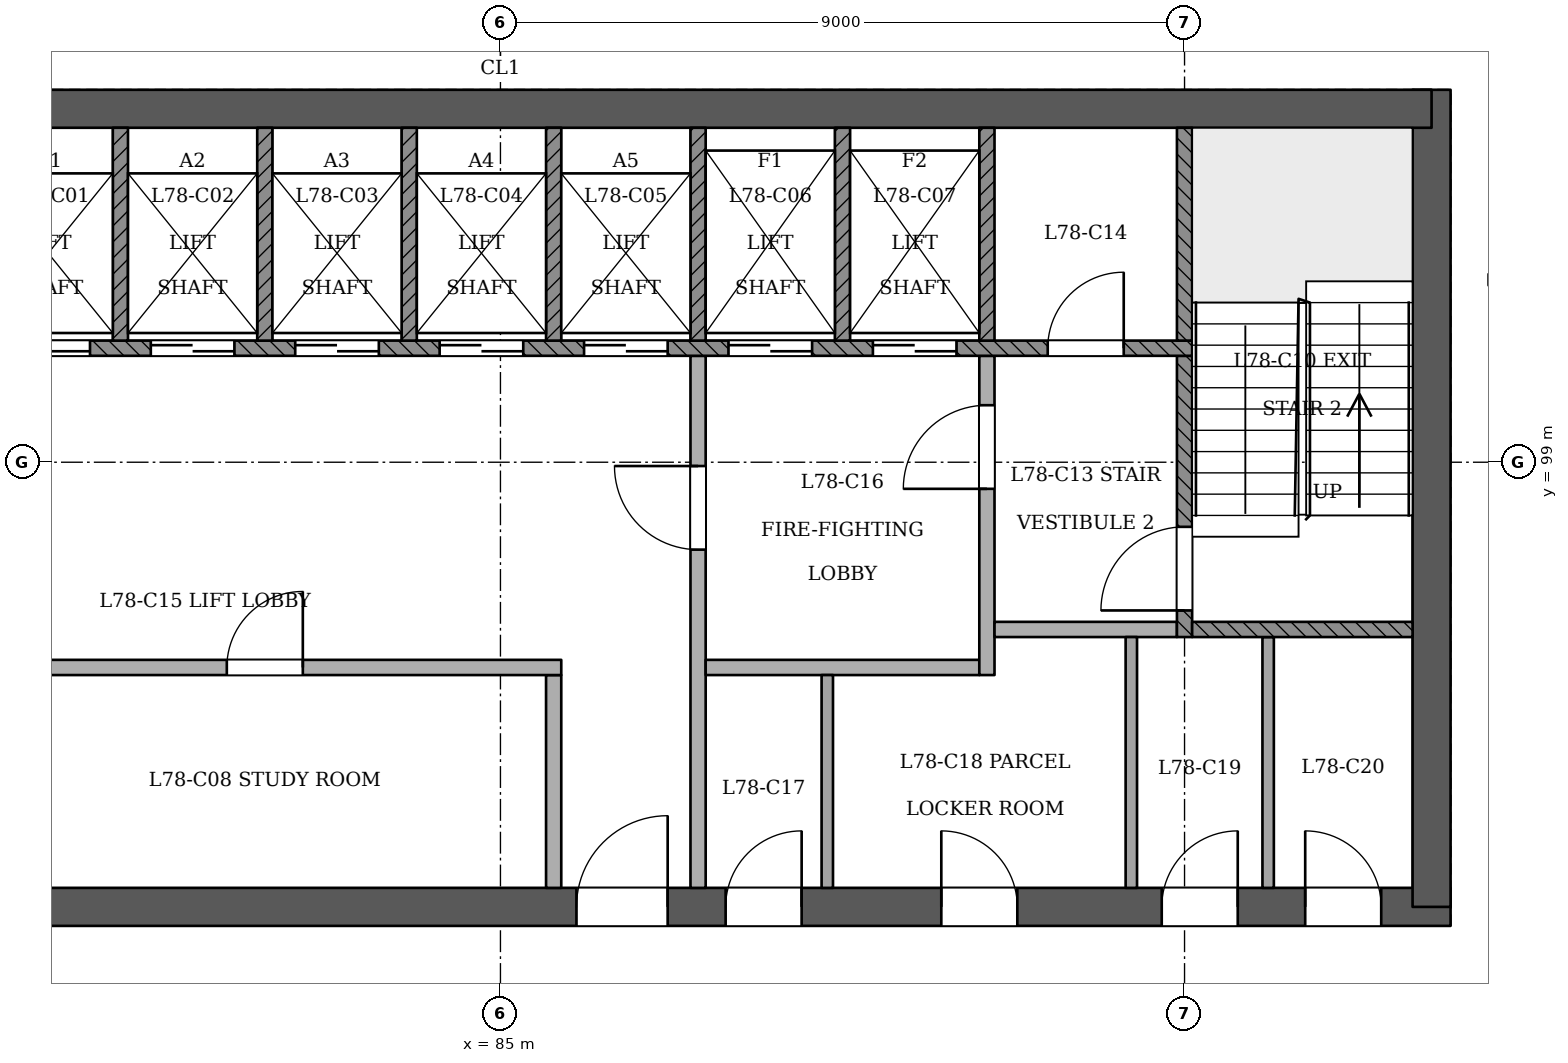
"""IFC4 building model, lengths in metres.
Left out: names, types, materials, properties, quantities, classifications, styles, units other than length and angle.
Written with IfcOpenShell. Run it as: python <this file> out.ifc"""

import sys

from ifc_helpers import new_model, si_unit, direction, frame, frame_2d, origin, place, context, subcontext, project, spatial, rectangle, extrude, element, fill, save


model = new_model("IFC4")
c1 = context("Model", 3, precision=1e-05, world=origin(), true_north=direction((0.0, 1.0)))
c2 = subcontext(c1, "Body", "Model", "MODEL_VIEW")
j1 = project(units=[si_unit("LENGTHUNIT", "METRE"), si_unit("PLANEANGLEUNIT", "RADIAN")], contexts=[c1])
p1 = place(None, origin())
s1 = spatial("IfcSite", under=j1, at=p1, CompositionType="ELEMENT")
p2 = place(p1, origin())
s2 = spatial("IfcBuilding", under=s1, at=p2, CompositionType="ELEMENT")
p3 = place(p2, frame((0.0, 0.0, 302.2)))
s3 = spatial("IfcBuildingStorey", under=s2, at=p3, CompositionType="ELEMENT", Elevation=302.2)
p4 = place(p3, frame((72.75, 93.15, 0.0), z_axis=(0.0, 0.0, 1.0), x_axis=(1.0, 0.0, 0.0)))
e1 = element("IfcWall", 1, at=p4, inside=s3, PredefinedType="SHEAR", context=c2, shape_type="SweptSolid", body=[
    extrude(rectangle(XDim=24.75, YDim=0.5, at=frame_2d((12.375, 0.0))), origin(), (0.0, 0.0, 1.0), 3.6),
])
p5 = place(p4, frame((1.05, 0.0, 0.0)))
e2 = element("IfcOpeningElement", 2, at=p5, cuts=e1, PredefinedType="OPENING", context=c2, shape_type="SweptSolid", body=[
    extrude(rectangle(XDim=1.2, YDim=2.1, at=frame_2d((0.6, 1.05))), frame((0.0, 0.26, 0.0), z_axis=(0.0, -1.0, 0.0), x_axis=(1.0, 0.0, 0.0)), (0.0, 0.0, 1.0), 0.521),
])
p6 = place(p4, frame((3.25, 0.0, 0.0)))
e3 = element("IfcOpeningElement", 3, at=p6, cuts=e1, PredefinedType="OPENING", context=c2, shape_type="SweptSolid", body=[
    extrude(rectangle(XDim=1.2, YDim=2.1, at=frame_2d((0.6, 1.05))), frame((0.0, 0.26, 0.0), z_axis=(0.0, -1.0, 0.0), x_axis=(1.0, 0.0, 0.0)), (0.0, 0.0, 1.0), 0.521),
])
p7 = place(p4, frame((13.25, 0.0, 0.0)))
e4 = element("IfcOpeningElement", 4, at=p7, cuts=e1, PredefinedType="OPENING", context=c2, shape_type="SweptSolid", body=[
    extrude(rectangle(XDim=1.2, YDim=2.1, at=frame_2d((0.6, 1.05))), frame((0.0, 0.26, 0.0), z_axis=(0.0, -1.0, 0.0), x_axis=(1.0, 0.0, 0.0)), (0.0, 0.0, 1.0), 0.521),
])
p8 = place(p4, frame((15.212, 0.0, 0.0)))
e5 = element("IfcOpeningElement", 5, at=p8, cuts=e1, PredefinedType="OPENING", context=c2, shape_type="SweptSolid", body=[
    extrude(rectangle(XDim=1.0, YDim=2.1, at=frame_2d((0.5, 1.05))), frame((0.0, 0.26, 0.0), z_axis=(0.0, -1.0, 0.0), x_axis=(1.0, 0.0, 0.0)), (0.0, 0.0, 1.0), 0.521),
])
p9 = place(p4, frame((18.05, 0.0, 0.0)))
e6 = element("IfcOpeningElement", 6, at=p9, cuts=e1, PredefinedType="OPENING", context=c2, shape_type="SweptSolid", body=[
    extrude(rectangle(XDim=1.0, YDim=2.1, at=frame_2d((0.5, 1.05))), frame((0.0, 0.26, 0.0), z_axis=(0.0, -1.0, 0.0), x_axis=(1.0, 0.0, 0.0)), (0.0, 0.0, 1.0), 0.521),
])
p10 = place(p4, frame((20.95, 0.0, 0.0)))
e7 = element("IfcOpeningElement", 7, at=p10, cuts=e1, PredefinedType="OPENING", context=c2, shape_type="SweptSolid", body=[
    extrude(rectangle(XDim=1.0, YDim=2.1, at=frame_2d((0.5, 1.05))), frame((0.0, 0.26, 0.0), z_axis=(0.0, -1.0, 0.0), x_axis=(1.0, 0.0, 0.0)), (0.0, 0.0, 1.0), 0.521),
])
p11 = place(p4, frame((22.837, 0.0, 0.0)))
e8 = element("IfcOpeningElement", 8, at=p11, cuts=e1, PredefinedType="OPENING", context=c2, shape_type="SweptSolid", body=[
    extrude(rectangle(XDim=1.0, YDim=2.1, at=frame_2d((0.5, 1.05))), frame((0.0, 0.26, 0.0), z_axis=(0.0, -1.0, 0.0), x_axis=(1.0, 0.0, 0.0)), (0.0, 0.0, 1.0), 0.521),
])
p12 = place(p3, frame((97.25, 93.15, 0.0), z_axis=(0.0, 0.0, 1.0), x_axis=(0.0, 1.0, 0.0)))
e9 = element("IfcWall", 9, at=p12, inside=s3, PredefinedType="SHEAR", context=c2, shape_type="SweptSolid", body=[
    extrude(rectangle(XDim=10.75, YDim=0.5, at=frame_2d((5.375, 0.0))), origin(), (0.0, 0.0, 1.0), 3.6),
])
p13 = place(p3, frame((97.25, 103.65, 0.0), z_axis=(0.0, 0.0, 1.0), x_axis=(-1.0, 0.0, 0.0)))
e10 = element("IfcWall", 10, at=p13, inside=s3, PredefinedType="SHEAR", context=c2, shape_type="SweptSolid", body=[
    extrude(rectangle(XDim=24.75, YDim=0.5, at=frame_2d((12.375, 0.0))), origin(), (0.0, 0.0, 1.0), 3.6),
])
p14 = place(p3, frame((99.726, 101.4, 0.0), z_axis=(0.0, 0.0, 1.0), x_axis=(-0.999999909973, 0.000424328109, 0.0)))
e11 = element("IfcWall", 11, at=p14, inside=s3, PredefinedType="PARTITIONING", context=c2, shape_type="SweptSolid", body=[
    extrude(rectangle(XDim=1.726, YDim=0.15, at=frame_2d((0.863, 0.0))), origin(), (0.0, 0.0, 1.0), 3.2),
])
p15 = place(p3, frame((85.7, 93.4, 0.0), z_axis=(0.0, 0.0, 1.0), x_axis=(0.0, 1.0, 0.0)))
e12 = element("IfcWall", 12, at=p15, inside=s3, PredefinedType="PARTITIONING", context=c2, shape_type="SweptSolid", body=[
    extrude(rectangle(XDim=2.8, YDim=0.2, at=frame_2d((1.4, 0.0))), origin(), (0.0, 0.0, 1.0), 3.2),
])
p16 = place(p3, frame((87.6, 93.4, 0.0), z_axis=(0.0, 0.0, 1.0), x_axis=(0.0, 1.0, 0.0)))
e13 = element("IfcWall", 13, at=p16, inside=s3, PredefinedType="PARTITIONING", context=c2, shape_type="SweptSolid", body=[
    extrude(rectangle(XDim=7.0, YDim=0.2, at=frame_2d((3.5, 0.0))), origin(), (0.0, 0.0, 1.0), 3.2),
])
p17 = place(p16, frame((4.45, 0.0, 0.0)))
e14 = element("IfcOpeningElement", 14, at=p17, cuts=e13, PredefinedType="OPENING", context=c2, shape_type="SweptSolid", body=[
    extrude(rectangle(XDim=1.1, YDim=2.1, at=frame_2d((0.55, 1.05))), frame((0.0, 0.11, 0.0), z_axis=(0.0, -1.0, 0.0), x_axis=(1.0, 0.0, 0.0)), (0.0, 0.0, 1.0), 0.221),
])
p18 = place(p3, frame((89.3, 93.4, 0.0), z_axis=(0.0, 0.0, 1.0), x_axis=(0.0, 1.0, 0.0)))
e15 = element("IfcWall", 15, at=p18, inside=s3, PredefinedType="PARTITIONING", context=c2, shape_type="SweptSolid", body=[
    extrude(rectangle(XDim=2.8, YDim=0.15, at=frame_2d((1.4, 0.0))), origin(), (0.0, 0.0, 1.0), 3.2),
])
for number, where, z_axis, x_axis in (
    (16, (93.3, 93.4, 0.0), (0.0, 0.0, 1.0), (0.0, 1.0, 0.0)),
    (17, (95.1, 93.4, 0.0), (0.0, 0.0, 1.0), (0.0, 1.0, 0.0)),
):
    element("IfcWall", number, at=place(p3, frame(where, z_axis=z_axis, x_axis=x_axis)), inside=s3, PredefinedType="PARTITIONING", context=c2, shape_type="SweptSolid", body=[
        extrude(rectangle(XDim=3.3, YDim=0.15, at=frame_2d((1.65, 0.0))), origin(), (0.0, 0.0, 1.0), 3.2),
    ])
p19 = place(p3, frame((78.0, 96.3, 0.0), z_axis=(0.0, 0.0, 1.0), x_axis=(1.0, 0.0, 0.0)))
e18 = element("IfcWall", 18, at=p19, inside=s3, PredefinedType="PARTITIONING", context=c2, shape_type="SweptSolid", body=[
    extrude(rectangle(XDim=7.8, YDim=0.2, at=frame_2d((3.9, 0.0))), origin(), (0.0, 0.0, 1.0), 3.2),
])
p20 = place(p19, frame((3.4, 0.0, 0.0)))
e19 = element("IfcOpeningElement", 19, at=p20, cuts=e18, PredefinedType="OPENING", context=c2, shape_type="SweptSolid", body=[
    extrude(rectangle(XDim=1.0, YDim=2.1, at=frame_2d((0.5, 1.05))), frame((0.0, 0.11, 0.0), z_axis=(0.0, -1.0, 0.0), x_axis=(1.0, 0.0, 0.0)), (0.0, 0.0, 1.0), 0.221),
])
p21 = place(p3, frame((87.7, 96.3, 0.0), z_axis=(0.0, 0.0, 1.0), x_axis=(1.0, 0.0, 0.0)))
e20 = element("IfcWall", 20, at=p21, inside=s3, PredefinedType="PARTITIONING", context=c2, shape_type="SweptSolid", body=[
    extrude(rectangle(XDim=3.6, YDim=0.2, at=frame_2d((1.8, 0.0))), origin(), (0.0, 0.0, 1.0), 3.2),
])
p22 = place(p3, frame((91.4, 96.2, 0.0), z_axis=(0.0, 0.0, 1.0), x_axis=(0.0, 1.0, 0.0)))
e21 = element("IfcWall", 21, at=p22, inside=s3, PredefinedType="PARTITIONING", context=c2, shape_type="SweptSolid", body=[
    extrude(rectangle(XDim=4.2, YDim=0.2, at=frame_2d((2.1, 0.0))), origin(), (0.0, 0.0, 1.0), 3.2),
])
p23 = place(p22, frame((2.45, 0.0, 0.0)))
e22 = element("IfcOpeningElement", 22, at=p23, cuts=e21, PredefinedType="OPENING", context=c2, shape_type="SweptSolid", body=[
    extrude(rectangle(XDim=1.1, YDim=2.1, at=frame_2d((0.55, 1.05))), frame((0.0, 0.11, 0.0), z_axis=(0.0, -1.0, 0.0), x_axis=(1.0, 0.0, 0.0)), (0.0, 0.0, 1.0), 0.221),
])
p24 = place(p3, frame((91.5, 96.8, 0.0), z_axis=(0.0, 0.0, 1.0), x_axis=(1.0, 0.0, 0.0)))
e23 = element("IfcWall", 23, at=p24, inside=s3, PredefinedType="PARTITIONING", context=c2, shape_type="SweptSolid", body=[
    extrude(rectangle(XDim=2.4, YDim=0.2, at=frame_2d((1.2, 0.0))), origin(), (0.0, 0.0, 1.0), 3.2),
])
p25 = place(p3, frame((94.0, 96.7, 0.0), z_axis=(0.0, 0.0, 1.0), x_axis=(0.0, 1.0, 0.0)))
e24 = element("IfcWall", 24, at=p25, inside=s3, PredefinedType="SOLIDWALL", context=c2, shape_type="SweptSolid", body=[
    extrude(rectangle(XDim=3.7, YDim=0.2, at=frame_2d((1.85, 0.0))), origin(), (0.0, 0.0, 1.0), 3.2),
])
p26 = place(p25, frame((0.35, 0.0, 0.0)))
e25 = element("IfcOpeningElement", 25, at=p26, cuts=e24, PredefinedType="OPENING", context=c2, shape_type="SweptSolid", body=[
    extrude(rectangle(XDim=1.1, YDim=2.1, at=frame_2d((0.55, 1.05))), frame((0.0, 0.11, 0.0), z_axis=(0.0, -1.0, 0.0), x_axis=(1.0, 0.0, 0.0)), (0.0, 0.0, 1.0), 0.221),
])
p27 = place(p3, frame((94.1, 96.8, 0.0), z_axis=(0.0, 0.0, 1.0), x_axis=(1.0, 0.0, 0.0)))
e26 = element("IfcWall", 26, at=p27, inside=s3, PredefinedType="SOLIDWALL", context=c2, shape_type="SweptSolid", body=[
    extrude(rectangle(XDim=2.9, YDim=0.2, at=frame_2d((1.45, 0.0))), origin(), (0.0, 0.0, 1.0), 3.2),
])
p28 = place(p3, frame((75.9, 100.5, 0.0), z_axis=(0.0, 0.0, 1.0), x_axis=(1.0, 0.0, 0.0)))
e27 = element("IfcWall", 27, at=p28, inside=s3, PredefinedType="SOLIDWALL", context=c2, shape_type="SweptSolid", body=[
    extrude(rectangle(XDim=18.2, YDim=0.2, at=frame_2d((9.1, 0.0))), origin(), (0.0, 0.0, 1.0), 3.2),
])
p29 = place(p28, frame((2.6, 0.0, 0.0)))
e28 = element("IfcOpeningElement", 28, at=p29, cuts=e27, PredefinedType="OPENING", context=c2, shape_type="SweptSolid", body=[
    extrude(rectangle(XDim=1.1, YDim=2.1, at=frame_2d((0.55, 1.05))), frame((0.0, 0.11, 0.0), z_axis=(0.0, -1.0, 0.0), x_axis=(1.0, 0.0, 0.0)), (0.0, 0.0, 1.0), 0.221),
])
p30 = place(p28, frame((4.5, 0.0, 0.0)))
e29 = element("IfcOpeningElement", 29, at=p30, cuts=e27, PredefinedType="OPENING", context=c2, shape_type="SweptSolid", body=[
    extrude(rectangle(XDim=1.1, YDim=2.1, at=frame_2d((0.55, 1.05))), frame((0.0, 0.11, 0.0), z_axis=(0.0, -1.0, 0.0), x_axis=(1.0, 0.0, 0.0)), (0.0, 0.0, 1.0), 0.221),
])
p31 = place(p28, frame((6.4, 0.0, 0.0)))
e30 = element("IfcOpeningElement", 30, at=p31, cuts=e27, PredefinedType="OPENING", context=c2, shape_type="SweptSolid", body=[
    extrude(rectangle(XDim=1.1, YDim=2.1, at=frame_2d((0.55, 1.05))), frame((0.0, 0.11, 0.0), z_axis=(0.0, -1.0, 0.0), x_axis=(1.0, 0.0, 0.0)), (0.0, 0.0, 1.0), 0.221),
])
p32 = place(p28, frame((8.3, 0.0, 0.0)))
e31 = element("IfcOpeningElement", 31, at=p32, cuts=e27, PredefinedType="OPENING", context=c2, shape_type="SweptSolid", body=[
    extrude(rectangle(XDim=1.1, YDim=2.1, at=frame_2d((0.55, 1.05))), frame((0.0, 0.11, 0.0), z_axis=(0.0, -1.0, 0.0), x_axis=(1.0, 0.0, 0.0)), (0.0, 0.0, 1.0), 0.221),
])
p33 = place(p28, frame((10.2, 0.0, 0.0)))
e32 = element("IfcOpeningElement", 32, at=p33, cuts=e27, PredefinedType="OPENING", context=c2, shape_type="SweptSolid", body=[
    extrude(rectangle(XDim=1.1, YDim=2.1, at=frame_2d((0.55, 1.05))), frame((0.0, 0.11, 0.0), z_axis=(0.0, -1.0, 0.0), x_axis=(1.0, 0.0, 0.0)), (0.0, 0.0, 1.0), 0.221),
])
p34 = place(p28, frame((12.1, 0.0, 0.0)))
e33 = element("IfcOpeningElement", 33, at=p34, cuts=e27, PredefinedType="OPENING", context=c2, shape_type="SweptSolid", body=[
    extrude(rectangle(XDim=1.1, YDim=2.1, at=frame_2d((0.55, 1.05))), frame((0.0, 0.11, 0.0), z_axis=(0.0, -1.0, 0.0), x_axis=(1.0, 0.0, 0.0)), (0.0, 0.0, 1.0), 0.221),
])
p35 = place(p28, frame((14.0, 0.0, 0.0)))
e34 = element("IfcOpeningElement", 34, at=p35, cuts=e27, PredefinedType="OPENING", context=c2, shape_type="SweptSolid", body=[
    extrude(rectangle(XDim=1.1, YDim=2.1, at=frame_2d((0.55, 1.05))), frame((0.0, 0.11, 0.0), z_axis=(0.0, -1.0, 0.0), x_axis=(1.0, 0.0, 0.0)), (0.0, 0.0, 1.0), 0.221),
])
p36 = place(p28, frame((0.65, 0.0, 0.0)))
e35 = element("IfcOpeningElement", 35, at=p36, cuts=e27, PredefinedType="OPENING", context=c2, shape_type="SweptSolid", body=[
    extrude(rectangle(XDim=1.0, YDim=2.1, at=frame_2d((0.5, 1.05))), frame((0.0, 0.11, 0.0), z_axis=(0.0, -1.0, 0.0), x_axis=(1.0, 0.0, 0.0)), (0.0, 0.0, 1.0), 0.221),
])
p37 = place(p28, frame((16.3, 0.0, 0.0)))
e36 = element("IfcOpeningElement", 36, at=p37, cuts=e27, PredefinedType="OPENING", context=c2, shape_type="SweptSolid", body=[
    extrude(rectangle(XDim=1.0, YDim=2.1, at=frame_2d((0.5, 1.05))), frame((0.0, 0.11, 0.0), z_axis=(0.0, -1.0, 0.0), x_axis=(1.0, 0.0, 0.0)), (0.0, 0.0, 1.0), 0.221),
])
for number, where, z_axis, x_axis in (
    (37, (80.0, 100.6, 0.0), (0.0, 0.0, 1.0), (0.0, 1.0, 0.0)),
    (38, (81.9, 100.6, 0.0), (0.0, 0.0, 1.0), (0.0, 1.0, 0.0)),
    (39, (83.8, 100.6, 0.0), (0.0, 0.0, 1.0), (0.0, 1.0, 0.0)),
    (40, (85.7, 100.6, 0.0), (0.0, 0.0, 1.0), (0.0, 1.0, 0.0)),
    (41, (87.6, 100.6, 0.0), (0.0, 0.0, 1.0), (0.0, 1.0, 0.0)),
    (42, (89.5, 100.6, 0.0), (0.0, 0.0, 1.0), (0.0, 1.0, 0.0)),
    (43, (91.4, 100.6, 0.0), (0.0, 0.0, 1.0), (0.0, 1.0, 0.0)),
    (44, (94.0, 100.6, 0.0), (0.0, 0.0, 1.0), (0.0, 1.0, 0.0)),
):
    element("IfcWall", number, at=place(p3, frame(where, z_axis=z_axis, x_axis=x_axis)), inside=s3, PredefinedType="SOLIDWALL", context=c2, shape_type="SweptSolid", body=[
        extrude(rectangle(XDim=2.8, YDim=0.2, at=frame_2d((1.4, 0.0))), origin(), (0.0, 0.0, 1.0), 3.2),
    ])
p38 = place(p29, origin())
e45 = element("IfcDoor", 45, at=p38, inside=s3, OperationType="SLIDING_TO_RIGHT", PredefinedType="NOTDEFINED", context=c2, shape_type="SweptSolid", body=[
    extrude(rectangle(XDim=1.1, YDim=2.1, at=frame_2d((0.55, 1.05))), frame((0.0, 0.025, 0.0), z_axis=(0.0, -1.0, 0.0), x_axis=(1.0, 0.0, 0.0)), (0.0, 0.0, 1.0), 0.05),
])
fill(e28, e45)
p39 = place(p30, origin())
e46 = element("IfcDoor", 46, at=p39, inside=s3, OperationType="SLIDING_TO_LEFT", PredefinedType="NOTDEFINED", context=c2, shape_type="SweptSolid", body=[
    extrude(rectangle(XDim=1.1, YDim=2.1, at=frame_2d((0.55, 1.05))), frame((0.0, 0.025, 0.0), z_axis=(0.0, -1.0, 0.0), x_axis=(1.0, 0.0, 0.0)), (0.0, 0.0, 1.0), 0.05),
])
fill(e29, e46)
p40 = place(p31, origin())
e47 = element("IfcDoor", 47, at=p40, inside=s3, OperationType="SLIDING_TO_RIGHT", PredefinedType="NOTDEFINED", context=c2, shape_type="SweptSolid", body=[
    extrude(rectangle(XDim=1.1, YDim=2.1, at=frame_2d((0.55, 1.05))), frame((0.0, 0.025, 0.0), z_axis=(0.0, -1.0, 0.0), x_axis=(1.0, 0.0, 0.0)), (0.0, 0.0, 1.0), 0.05),
])
fill(e30, e47)
p41 = place(p32, origin())
e48 = element("IfcDoor", 48, at=p41, inside=s3, OperationType="SLIDING_TO_LEFT", PredefinedType="NOTDEFINED", context=c2, shape_type="SweptSolid", body=[
    extrude(rectangle(XDim=1.1, YDim=2.1, at=frame_2d((0.55, 1.05))), frame((0.0, 0.025, 0.0), z_axis=(0.0, -1.0, 0.0), x_axis=(1.0, 0.0, 0.0)), (0.0, 0.0, 1.0), 0.05),
])
fill(e31, e48)
p42 = place(p33, origin())
e49 = element("IfcDoor", 49, at=p42, inside=s3, OperationType="SLIDING_TO_RIGHT", PredefinedType="NOTDEFINED", context=c2, shape_type="SweptSolid", body=[
    extrude(rectangle(XDim=1.1, YDim=2.1, at=frame_2d((0.55, 1.05))), frame((0.0, 0.025, 0.0), z_axis=(0.0, -1.0, 0.0), x_axis=(1.0, 0.0, 0.0)), (0.0, 0.0, 1.0), 0.05),
])
fill(e32, e49)
p43 = place(p34, origin())
e50 = element("IfcDoor", 50, at=p43, inside=s3, OperationType="SLIDING_TO_RIGHT", PredefinedType="NOTDEFINED", context=c2, shape_type="SweptSolid", body=[
    extrude(rectangle(XDim=1.1, YDim=2.1, at=frame_2d((0.55, 1.05))), frame((0.0, 0.025, 0.0), z_axis=(0.0, -1.0, 0.0), x_axis=(1.0, 0.0, 0.0)), (0.0, 0.0, 1.0), 0.05),
])
fill(e33, e50)
p44 = place(p35, origin())
e51 = element("IfcDoor", 51, at=p44, inside=s3, OperationType="SLIDING_TO_LEFT", PredefinedType="NOTDEFINED", context=c2, shape_type="SweptSolid", body=[
    extrude(rectangle(XDim=1.1, YDim=2.1, at=frame_2d((0.55, 1.05))), frame((0.0, 0.025, 0.0), z_axis=(0.0, -1.0, 0.0), x_axis=(1.0, 0.0, 0.0)), (0.0, 0.0, 1.0), 0.05),
])
fill(e34, e51)
p45 = place(p26, origin())
e52 = element("IfcDoor", 52, at=p45, inside=s3, OperationType="SINGLE_SWING_LEFT", PredefinedType="NOTDEFINED", context=c2, shape_type="SweptSolid", body=[
    extrude(rectangle(XDim=1.1, YDim=2.1, at=frame_2d((0.55, 1.05))), frame((0.0, 0.025, 0.0), z_axis=(0.0, -1.0, 0.0), x_axis=(1.0, 0.0, 0.0)), (0.0, 0.0, 1.0), 0.05),
])
fill(e25, e52)
p46 = place(p17, origin())
e53 = element("IfcDoor", 53, at=p46, inside=s3, OperationType="SINGLE_SWING_RIGHT", PredefinedType="NOTDEFINED", context=c2, shape_type="SweptSolid", body=[
    extrude(rectangle(XDim=1.1, YDim=2.1, at=frame_2d((0.55, 1.05))), frame((0.0, 0.025, 0.0), z_axis=(0.0, -1.0, 0.0), x_axis=(1.0, 0.0, 0.0)), (0.0, 0.0, 1.0), 0.05),
])
fill(e14, e53)
p47 = place(p23, origin())
e54 = element("IfcDoor", 54, at=p47, inside=s3, OperationType="SINGLE_SWING_LEFT", PredefinedType="NOTDEFINED", context=c2, shape_type="SweptSolid", body=[
    extrude(rectangle(XDim=1.1, YDim=2.1, at=frame_2d((0.55, 1.05))), frame((0.0, 0.025, 0.0), z_axis=(0.0, -1.0, 0.0), x_axis=(1.0, 0.0, 0.0)), (0.0, 0.0, 1.0), 0.05),
])
fill(e22, e54)
p48 = place(p7, origin())
e55 = element("IfcDoor", 55, at=p48, inside=s3, OperationType="SINGLE_SWING_RIGHT", PredefinedType="NOTDEFINED", context=c2, shape_type="SweptSolid", body=[
    extrude(rectangle(XDim=1.2, YDim=2.1, at=frame_2d((0.6, 1.05))), frame((0.0, 0.025, 0.0), z_axis=(0.0, -1.0, 0.0), x_axis=(1.0, 0.0, 0.0)), (0.0, 0.0, 1.0), 0.05),
])
fill(e4, e55)
p49 = place(p37, origin())
e56 = element("IfcDoor", 56, at=p49, inside=s3, OperationType="SINGLE_SWING_RIGHT", PredefinedType="NOTDEFINED", context=c2, shape_type="SweptSolid", body=[
    extrude(rectangle(XDim=1.0, YDim=2.1, at=frame_2d((0.5, 1.05))), frame((0.0, 0.025, 0.0), z_axis=(0.0, -1.0, 0.0), x_axis=(1.0, 0.0, 0.0)), (0.0, 0.0, 1.0), 0.05),
])
fill(e36, e56)
p50 = place(p8, origin())
e57 = element("IfcDoor", 57, at=p50, inside=s3, OperationType="SINGLE_SWING_RIGHT", PredefinedType="NOTDEFINED", context=c2, shape_type="SweptSolid", body=[
    extrude(rectangle(XDim=1.0, YDim=2.1, at=frame_2d((0.5, 1.05))), frame((0.0, 0.025, 0.0), z_axis=(0.0, -1.0, 0.0), x_axis=(1.0, 0.0, 0.0)), (0.0, 0.0, 1.0), 0.05),
])
fill(e5, e57)
p51 = place(p9, origin())
e58 = element("IfcDoor", 58, at=p51, inside=s3, OperationType="SINGLE_SWING_LEFT", PredefinedType="NOTDEFINED", context=c2, shape_type="SweptSolid", body=[
    extrude(rectangle(XDim=1.0, YDim=2.1, at=frame_2d((0.5, 1.05))), frame((0.0, 0.025, 0.0), z_axis=(0.0, -1.0, 0.0), x_axis=(1.0, 0.0, 0.0)), (0.0, 0.0, 1.0), 0.05),
])
fill(e6, e58)
p52 = place(p10, origin())
e59 = element("IfcDoor", 59, at=p52, inside=s3, OperationType="SINGLE_SWING_RIGHT", PredefinedType="NOTDEFINED", context=c2, shape_type="SweptSolid", body=[
    extrude(rectangle(XDim=1.0, YDim=2.1, at=frame_2d((0.5, 1.05))), frame((0.0, 0.025, 0.0), z_axis=(0.0, -1.0, 0.0), x_axis=(1.0, 0.0, 0.0)), (0.0, 0.0, 1.0), 0.05),
])
fill(e7, e59)
p53 = place(p11, origin())
e60 = element("IfcDoor", 60, at=p53, inside=s3, OperationType="SINGLE_SWING_LEFT", PredefinedType="NOTDEFINED", context=c2, shape_type="SweptSolid", body=[
    extrude(rectangle(XDim=1.0, YDim=2.1, at=frame_2d((0.5, 1.05))), frame((0.0, 0.025, 0.0), z_axis=(0.0, -1.0, 0.0), x_axis=(1.0, 0.0, 0.0)), (0.0, 0.0, 1.0), 0.05),
])
fill(e8, e60)
p54 = place(p20, origin())
e61 = element("IfcDoor", 61, at=p54, inside=s3, OperationType="SINGLE_SWING_RIGHT", PredefinedType="NOTDEFINED", context=c2, shape_type="SweptSolid", body=[
    extrude(rectangle(XDim=1.0, YDim=2.1, at=frame_2d((0.5, 1.05))), frame((0.0, 0.025, 0.0), z_axis=(0.0, -1.0, 0.0), x_axis=(1.0, 0.0, 0.0)), (0.0, 0.0, 1.0), 0.05),
])
fill(e19, e61)
save(model, sys.argv[1])
